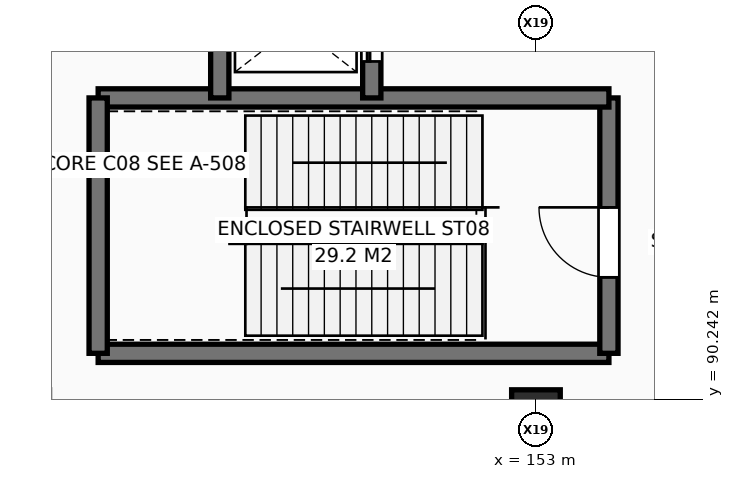
"""IFC4 building model, lengths in metres.
Left out: names, types, materials, properties, quantities, classifications, styles, units other than length and angle.
Written with IfcOpenShell. Run it as: python <this file> out.ifc"""

import sys

from ifc_helpers import new_model, si_unit, direction, frame, frame_2d, origin, origin_2d, place, context, subcontext, project, spatial, rectangle, extrude, element, fill, save


model = new_model("IFC4")
c1 = context("Model", 3, precision=1e-05, world=origin(), true_north=direction((0.0, 1.0)))
c2 = subcontext(c1, "Body", "Model", "MODEL_VIEW")
j1 = project(units=[si_unit("LENGTHUNIT", "METRE"), si_unit("PLANEANGLEUNIT", "RADIAN")], contexts=[c1])
p1 = place(None, origin())
s1 = spatial("IfcSite", under=j1, at=p1, CompositionType="ELEMENT")
p2 = place(p1, origin())
s2 = spatial("IfcBuilding", under=s1, at=p2, CompositionType="ELEMENT")
p3 = place(p2, origin())
s3 = spatial("IfcBuildingStorey", under=s2, at=p3, CompositionType="ELEMENT", Elevation=0.0)
p4 = place(p3, frame((153.0, 90.0, 0.0), z_axis=(0.0, 0.0, 1.0), x_axis=(1.0, 0.0, 0.0)))
e1 = element("IfcColumn", 1, at=p4, inside=s3, PredefinedType="COLUMN", context=c2, shape_type="SweptSolid", body=[
    extrude(rectangle(XDim=0.8, YDim=0.8, at=origin_2d()), origin(), (0.0, 0.0, 1.0), 5.4),
])
p5 = place(p3, frame((145.8, 91.0, 0.0), z_axis=(0.0, 0.0, 1.0), x_axis=(1.0, 0.0, 0.0)))
e2 = element("IfcWall", 2, at=p5, inside=s3, PredefinedType="SHEAR", context=c2, shape_type="SweptSolid", body=[
    extrude(rectangle(XDim=8.4, YDim=0.3, at=frame_2d((4.2, 0.0))), origin(), (0.0, 0.0, 1.0), 5.12),
])
p6 = place(p3, frame((154.2, 91.0, 0.0), z_axis=(0.0, 0.0, 1.0), x_axis=(0.0, 1.0, 0.0)))
e3 = element("IfcWall", 3, at=p6, inside=s3, PredefinedType="SHEAR", context=c2, shape_type="SweptSolid", body=[
    extrude(rectangle(XDim=4.2, YDim=0.3, at=frame_2d((2.1, 0.0))), origin(), (0.0, 0.0, 1.0), 5.12),
])
p7 = place(p6, frame((1.25, 0.0, 0.0)))
e4 = element("IfcOpeningElement", 4, at=p7, cuts=e3, PredefinedType="OPENING", context=c2, shape_type="SweptSolid", body=[
    extrude(rectangle(XDim=1.15, YDim=2.2, at=frame_2d((0.575, 1.1))), frame((0.0, 0.16, 0.0), z_axis=(0.0, -1.0, 0.0), x_axis=(1.0, 0.0, 0.0)), (0.0, 0.0, 1.0), 0.32),
])
p8 = place(p3, frame((154.2, 95.2, 0.0), z_axis=(0.0, 0.0, 1.0), x_axis=(-1.0, 0.0, 0.0)))
e5 = element("IfcWall", 5, at=p8, inside=s3, PredefinedType="SHEAR", context=c2, shape_type="SweptSolid", body=[
    extrude(rectangle(XDim=8.4, YDim=0.3, at=frame_2d((4.2, 0.0))), origin(), (0.0, 0.0, 1.0), 5.12),
])
p9 = place(p3, frame((145.8, 95.2, 0.0), z_axis=(0.0, 0.0, 1.0), x_axis=(0.0, -1.0, 0.0)))
e6 = element("IfcWall", 6, at=p9, inside=s3, PredefinedType="SHEAR", context=c2, shape_type="SweptSolid", body=[
    extrude(rectangle(XDim=4.2, YDim=0.3, at=frame_2d((2.1, 0.0))), origin(), (0.0, 0.0, 1.0), 5.12),
])
p10 = place(p3, frame((147.8, 97.6, 0.0), z_axis=(0.0, 0.0, 1.0), x_axis=(0.0, -1.0, 0.0)))
e7 = element("IfcWall", 7, at=p10, inside=s3, PredefinedType="SHEAR", context=c2, shape_type="SweptSolid", body=[
    extrude(rectangle(XDim=2.4, YDim=0.3, at=frame_2d((1.2, 0.0))), origin(), (0.0, 0.0, 1.0), 5.12),
])
p11 = place(p3, frame((150.3, 95.2, 0.0), z_axis=(0.0, 0.0, 1.0), x_axis=(0.0, 1.0, 0.0)))
e8 = element("IfcWall", 8, at=p11, inside=s3, PredefinedType="SHEAR", context=c2, shape_type="SweptSolid", body=[
    extrude(rectangle(XDim=2.4, YDim=0.3, at=frame_2d((1.2, 0.0))), origin(), (0.0, 0.0, 1.0), 5.12),
])
p12 = place(p11, frame((0.6, 0.0, 0.0)))
e9 = element("IfcOpeningElement", 9, at=p12, cuts=e8, PredefinedType="OPENING", context=c2, shape_type="SweptSolid", body=[
    extrude(rectangle(XDim=1.2, YDim=2.25, at=frame_2d((0.6, 1.125))), frame((0.0, 0.16, 0.0), z_axis=(0.0, -1.0, 0.0), x_axis=(1.0, 0.0, 0.0)), (0.0, 0.0, 1.0), 0.32),
])
p13 = place(p7, frame((1.15, 0.0, 0.0), z_axis=(0.0, 0.0, 1.0), x_axis=(-1.0, 0.0, 0.0)))
e10 = element("IfcDoor", 10, at=p13, inside=s3, OperationType="SINGLE_SWING_RIGHT", PredefinedType="DOOR", context=c2, shape_type="SweptSolid", body=[
    extrude(rectangle(XDim=1.15, YDim=2.2, at=frame_2d((0.575, 1.1))), frame((0.0, 0.025, 0.0), z_axis=(0.0, -1.0, 0.0), x_axis=(1.0, 0.0, 0.0)), (0.0, 0.0, 1.0), 0.05),
])
fill(e4, e10)
p14 = place(p12, origin())
e11 = element("IfcDoor", 11, at=p14, inside=s3, OperationType="SLIDING_TO_LEFT", PredefinedType="DOOR", context=c2, shape_type="SweptSolid", body=[
    extrude(rectangle(XDim=1.2, YDim=2.25, at=frame_2d((0.6, 1.125))), frame((0.0, 0.025, 0.0), z_axis=(0.0, -1.0, 0.0), x_axis=(1.0, 0.0, 0.0)), (0.0, 0.0, 1.0), 0.05),
])
fill(e9, e11)
save(model, sys.argv[1])
